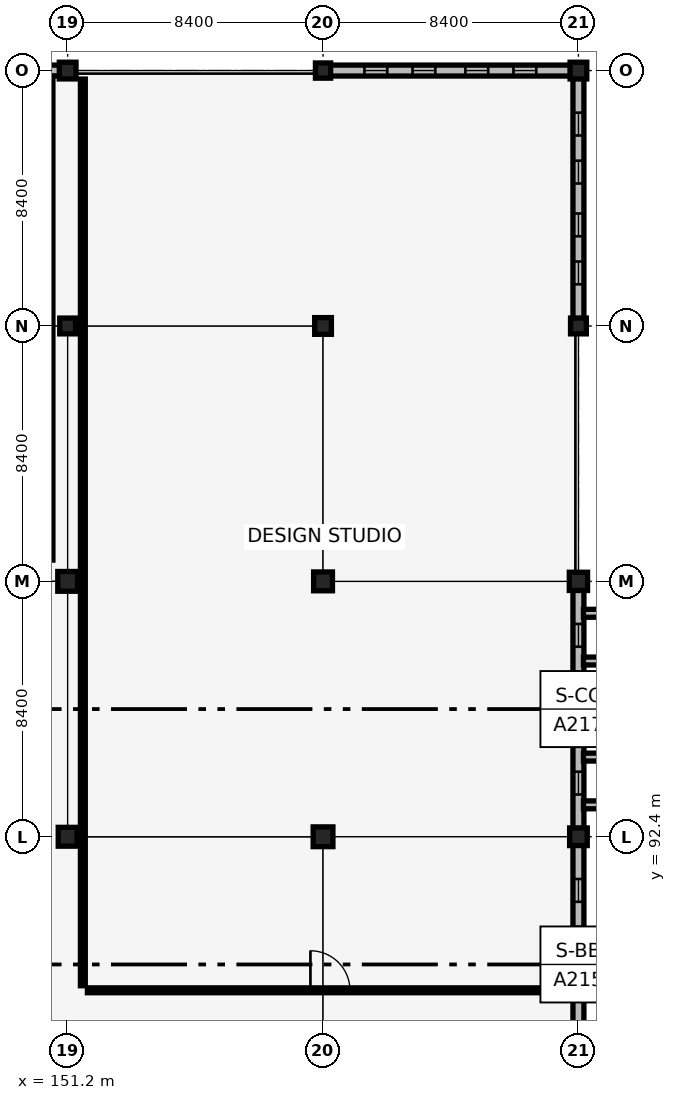
"""IFC4 building model, lengths in metres.
Left out: names, types, materials, properties, quantities, classifications, styles, units other than length and angle.
Written with IfcOpenShell. Run it as: python <this file> out.ifc"""

import sys

from ifc_helpers import new_model, si_unit, direction, frame, frame_2d, origin, origin_2d, place, context, subcontext, project, spatial, rectangle, extrude, element, fill, save


model = new_model("IFC4")
c1 = context("Model", 3, precision=1e-05, world=origin(), true_north=direction((0.0, 1.0)))
c2 = subcontext(c1, "Body", "Model", "MODEL_VIEW")
j1 = project(units=[si_unit("LENGTHUNIT", "METRE"), si_unit("PLANEANGLEUNIT", "RADIAN")], contexts=[c1])
p1 = place(None, origin())
s1 = spatial("IfcSite", under=j1, at=p1, CompositionType="ELEMENT")
p2 = place(p1, origin())
s2 = spatial("IfcBuilding", under=s1, at=p2, CompositionType="ELEMENT")
p3 = place(p2, frame((0.0, 0.0, 13.94)))
s3 = spatial("IfcBuildingStorey", under=s2, at=p3, CompositionType="ELEMENT", Elevation=13.94)
p4 = place(p3, frame((151.2, 92.4, 0.0), z_axis=(0.0, 0.0, 1.0), x_axis=(1.0, 0.0, 0.0)))
e1 = element("IfcColumn", 1, at=p4, inside=s3, PredefinedType="COLUMN", context=c2, shape_type="SweptSolid", body=[
    extrude(rectangle(XDim=0.62, YDim=0.62, at=origin_2d()), origin(), (0.0, 0.0, 1.0), 3.78),
])
p5 = place(p3, frame((151.2, 100.8, 0.0), z_axis=(0.0, 0.0, 1.0), x_axis=(1.0, 0.0, 0.0)))
e2 = element("IfcColumn", 2, at=p5, inside=s3, PredefinedType="COLUMN", context=c2, shape_type="SweptSolid", body=[
    extrude(rectangle(XDim=0.65, YDim=0.65, at=origin_2d()), origin(), (0.0, 0.0, 1.0), 3.78),
])
p6 = place(p3, frame((151.2, 109.2, 0.0), z_axis=(0.0, 0.0, 1.0), x_axis=(1.0, 0.0, 0.0)))
e3 = element("IfcColumn", 3, at=p6, inside=s3, PredefinedType="COLUMN", context=c2, shape_type="SweptSolid", body=[
    extrude(rectangle(XDim=0.52, YDim=0.52, at=origin_2d()), origin(), (0.0, 0.0, 1.0), 3.78),
])
p7 = place(p3, frame((151.2, 117.6, 0.0), z_axis=(0.0, 0.0, 1.0), x_axis=(1.0, 0.0, 0.0)))
e4 = element("IfcColumn", 4, at=p7, inside=s3, PredefinedType="COLUMN", context=c2, shape_type="SweptSolid", body=[
    extrude(rectangle(XDim=0.55, YDim=0.55, at=origin_2d()), origin(), (0.0, 0.0, 1.0), 3.78),
])
p8 = place(p3, frame((159.6, 92.4, 0.0), z_axis=(0.0, 0.0, 1.0), x_axis=(1.0, 0.0, 0.0)))
e5 = element("IfcColumn", 5, at=p8, inside=s3, PredefinedType="COLUMN", context=c2, shape_type="SweptSolid", body=[
    extrude(rectangle(XDim=0.65, YDim=0.65, at=origin_2d()), origin(), (0.0, 0.0, 1.0), 3.78),
])
p9 = place(p3, frame((159.6, 100.8, 0.0), z_axis=(0.0, 0.0, 1.0), x_axis=(1.0, 0.0, 0.0)))
e6 = element("IfcColumn", 6, at=p9, inside=s3, PredefinedType="COLUMN", context=c2, shape_type="SweptSolid", body=[
    extrude(rectangle(XDim=0.62, YDim=0.62, at=origin_2d()), origin(), (0.0, 0.0, 1.0), 3.78),
])
p10 = place(p3, frame((159.6, 109.2, 0.0), z_axis=(0.0, 0.0, 1.0), x_axis=(1.0, 0.0, 0.0)))
e7 = element("IfcColumn", 7, at=p10, inside=s3, PredefinedType="COLUMN", context=c2, shape_type="SweptSolid", body=[
    extrude(rectangle(XDim=0.55, YDim=0.55, at=origin_2d()), origin(), (0.0, 0.0, 1.0), 3.78),
])
p11 = place(p3, frame((159.6, 117.6, 0.0), z_axis=(0.0, 0.0, 1.0), x_axis=(1.0, 0.0, 0.0)))
e8 = element("IfcColumn", 8, at=p11, inside=s3, PredefinedType="COLUMN", context=c2, shape_type="SweptSolid", body=[
    extrude(rectangle(XDim=0.5, YDim=0.5, at=origin_2d()), origin(), (0.0, 0.0, 1.0), 3.78),
])
p12 = place(p3, frame((168.0, 92.4, 0.0), z_axis=(0.0, 0.0, 1.0), x_axis=(1.0, 0.0, 0.0)))
e9 = element("IfcColumn", 9, at=p12, inside=s3, PredefinedType="COLUMN", context=c2, shape_type="SweptSolid", body=[
    extrude(rectangle(XDim=0.58, YDim=0.58, at=origin_2d()), origin(), (0.0, 0.0, 1.0), 3.78),
])
p13 = place(p3, frame((168.0, 100.8, 0.0), z_axis=(0.0, 0.0, 1.0), x_axis=(1.0, 0.0, 0.0)))
e10 = element("IfcColumn", 10, at=p13, inside=s3, PredefinedType="COLUMN", context=c2, shape_type="SweptSolid", body=[
    extrude(rectangle(XDim=0.6, YDim=0.6, at=origin_2d()), origin(), (0.0, 0.0, 1.0), 3.78),
])
p14 = place(p3, frame((168.0, 109.2, 0.0), z_axis=(0.0, 0.0, 1.0), x_axis=(1.0, 0.0, 0.0)))
e11 = element("IfcColumn", 11, at=p14, inside=s3, PredefinedType="COLUMN", context=c2, shape_type="SweptSolid", body=[
    extrude(rectangle(XDim=0.52, YDim=0.52, at=origin_2d()), origin(), (0.0, 0.0, 1.0), 3.78),
])
p15 = place(p3, frame((168.0, 117.6, 0.0), z_axis=(0.0, 0.0, 1.0), x_axis=(1.0, 0.0, 0.0)))
e12 = element("IfcColumn", 12, at=p15, inside=s3, PredefinedType="COLUMN", context=c2, shape_type="SweptSolid", body=[
    extrude(rectangle(XDim=0.55, YDim=0.55, at=origin_2d()), origin(), (0.0, 0.0, 1.0), 3.78),
])
p16 = place(p3, frame((143.035, 117.6, 0.0), z_axis=(0.0, 0.0, 1.0), x_axis=(1.0, 0.0, 0.0)))
e13 = element("IfcWall", 13, at=p16, inside=s3, PredefinedType="SOLIDWALL", context=c2, shape_type="SweptSolid", body=[
    extrude(rectangle(XDim=7.905, YDim=0.36, at=frame_2d((3.953, 0.0))), origin(), (0.0, 0.0, 1.0), 3.15),
])
p17 = place(p16, frame((1.127, 0.0, 0.7)))
e14 = element("IfcOpeningElement", 14, at=p17, cuts=e13, PredefinedType="OPENING", context=c2, shape_type="SweptSolid", body=[
    extrude(rectangle(XDim=0.75, YDim=2.1, at=frame_2d((0.375, 1.05))), frame((0.0, 0.19, 0.0), z_axis=(0.0, -1.0, 0.0), x_axis=(1.0, 0.0, 0.0)), (0.0, 0.0, 1.0), 0.38),
])
p18 = place(p16, frame((2.708, 0.0, 0.7)))
e15 = element("IfcOpeningElement", 15, at=p18, cuts=e13, PredefinedType="OPENING", context=c2, shape_type="SweptSolid", body=[
    extrude(rectangle(XDim=0.75, YDim=2.1, at=frame_2d((0.375, 1.05))), frame((0.0, 0.19, 0.0), z_axis=(0.0, -1.0, 0.0), x_axis=(1.0, 0.0, 0.0)), (0.0, 0.0, 1.0), 0.38),
])
p19 = place(p16, frame((4.447, 0.0, 0.7)))
e16 = element("IfcOpeningElement", 16, at=p19, cuts=e13, PredefinedType="OPENING", context=c2, shape_type="SweptSolid", body=[
    extrude(rectangle(XDim=0.75, YDim=2.1, at=frame_2d((0.375, 1.05))), frame((0.0, 0.19, 0.0), z_axis=(0.0, -1.0, 0.0), x_axis=(1.0, 0.0, 0.0)), (0.0, 0.0, 1.0), 0.38),
])
p20 = place(p16, frame((6.028, 0.0, 0.7)))
e17 = element("IfcOpeningElement", 17, at=p20, cuts=e13, PredefinedType="OPENING", context=c2, shape_type="SweptSolid", body=[
    extrude(rectangle(XDim=0.75, YDim=2.1, at=frame_2d((0.375, 1.05))), frame((0.0, 0.19, 0.0), z_axis=(0.0, -1.0, 0.0), x_axis=(1.0, 0.0, 0.0)), (0.0, 0.0, 1.0), 0.38),
])
p21 = place(p3, frame((168.0, 84.285, 0.0), z_axis=(0.0, 0.0, 1.0), x_axis=(0.0, 1.0, 0.0)))
e18 = element("IfcWall", 18, at=p21, inside=s3, PredefinedType="SOLIDWALL", context=c2, shape_type="SweptSolid", body=[
    extrude(rectangle(XDim=7.84, YDim=0.36, at=frame_2d((3.92, 0.0))), origin(), (0.0, 0.0, 1.0), 3.15),
])
p22 = place(p21, frame((1.115, 0.0, 0.7)))
e19 = element("IfcOpeningElement", 19, at=p22, cuts=e18, PredefinedType="OPENING", context=c2, shape_type="SweptSolid", body=[
    extrude(rectangle(XDim=0.75, YDim=2.1, at=frame_2d((0.375, 1.05))), frame((0.0, 0.19, 0.0), z_axis=(0.0, -1.0, 0.0), x_axis=(1.0, 0.0, 0.0)), (0.0, 0.0, 1.0), 0.38),
])
p23 = place(p21, frame((4.407, 0.0, 0.7)))
e20 = element("IfcOpeningElement", 20, at=p23, cuts=e18, PredefinedType="OPENING", context=c2, shape_type="SweptSolid", body=[
    extrude(rectangle(XDim=0.75, YDim=2.1, at=frame_2d((0.375, 1.05))), frame((0.0, 0.19, 0.0), z_axis=(0.0, -1.0, 0.0), x_axis=(1.0, 0.0, 0.0)), (0.0, 0.0, 1.0), 0.38),
])
p24 = place(p21, frame((5.975, 0.0, 0.7)))
e21 = element("IfcOpeningElement", 21, at=p24, cuts=e18, PredefinedType="OPENING", context=c2, shape_type="SweptSolid", body=[
    extrude(rectangle(XDim=0.75, YDim=2.1, at=frame_2d((0.375, 1.05))), frame((0.0, 0.19, 0.0), z_axis=(0.0, -1.0, 0.0), x_axis=(1.0, 0.0, 0.0)), (0.0, 0.0, 1.0), 0.38),
])
p25 = place(p3, frame((168.0, 92.675, 0.0), z_axis=(0.0, 0.0, 1.0), x_axis=(0.0, 1.0, 0.0)))
e22 = element("IfcWall", 22, at=p25, inside=s3, PredefinedType="SOLIDWALL", context=c2, shape_type="SweptSolid", body=[
    extrude(rectangle(XDim=7.84, YDim=0.36, at=frame_2d((3.92, 0.0))), origin(), (0.0, 0.0, 1.0), 3.15),
])
p26 = place(p25, frame((1.115, 0.0, 0.7)))
e23 = element("IfcOpeningElement", 23, at=p26, cuts=e22, PredefinedType="OPENING", context=c2, shape_type="SweptSolid", body=[
    extrude(rectangle(XDim=0.75, YDim=2.1, at=frame_2d((0.375, 1.05))), frame((0.0, 0.19, 0.0), z_axis=(0.0, -1.0, 0.0), x_axis=(1.0, 0.0, 0.0)), (0.0, 0.0, 1.0), 0.38),
])
p27 = place(p25, frame((2.683, 0.0, 0.7)))
e24 = element("IfcOpeningElement", 24, at=p27, cuts=e22, PredefinedType="OPENING", context=c2, shape_type="SweptSolid", body=[
    extrude(rectangle(XDim=0.75, YDim=2.1, at=frame_2d((0.375, 1.05))), frame((0.0, 0.19, 0.0), z_axis=(0.0, -1.0, 0.0), x_axis=(1.0, 0.0, 0.0)), (0.0, 0.0, 1.0), 0.38),
])
p28 = place(p25, frame((4.407, 0.0, 0.7)))
e25 = element("IfcOpeningElement", 25, at=p28, cuts=e22, PredefinedType="OPENING", context=c2, shape_type="SweptSolid", body=[
    extrude(rectangle(XDim=0.75, YDim=2.1, at=frame_2d((0.375, 1.05))), frame((0.0, 0.19, 0.0), z_axis=(0.0, -1.0, 0.0), x_axis=(1.0, 0.0, 0.0)), (0.0, 0.0, 1.0), 0.38),
])
p29 = place(p25, frame((5.975, 0.0, 0.7)))
e26 = element("IfcOpeningElement", 26, at=p29, cuts=e22, PredefinedType="OPENING", context=c2, shape_type="SweptSolid", body=[
    extrude(rectangle(XDim=0.75, YDim=2.1, at=frame_2d((0.375, 1.05))), frame((0.0, 0.19, 0.0), z_axis=(0.0, -1.0, 0.0), x_axis=(1.0, 0.0, 0.0)), (0.0, 0.0, 1.0), 0.38),
])
for number, where, z_axis, x_axis in (
    (27, (168.165, 93.45, 0.0), (0.0, 0.0, 1.0), (1.0, 0.0, 0.0)),
    (28, (168.165, 95.02, 0.0), (0.0, 0.0, 1.0), (1.0, 0.0, 0.0)),
    (29, (168.165, 96.6, 0.0), (0.0, 0.0, 1.0), (1.0, 0.0, 0.0)),
    (30, (168.165, 98.18, 0.0), (0.0, 0.0, 1.0), (1.0, 0.0, 0.0)),
    (31, (168.165, 99.75, 0.0), (0.0, 0.0, 1.0), (1.0, 0.0, 0.0)),
):
    element("IfcWall", number, at=place(p3, frame(where, z_axis=z_axis, x_axis=x_axis)), inside=s3, PredefinedType="SOLIDWALL", context=c2, shape_type="SweptSolid", body=[
        extrude(rectangle(XDim=0.7, YDim=0.26, at=frame_2d((0.35, 0.0))), origin(), (0.0, 0.0, 1.0), 4.08),
    ])
p30 = place(p3, frame((159.835, 117.6, 0.0), z_axis=(0.0, 0.0, 1.0), x_axis=(1.0, 0.0, 0.0)))
e32 = element("IfcWall", 32, at=p30, inside=s3, PredefinedType="SOLIDWALL", context=c2, shape_type="SweptSolid", body=[
    extrude(rectangle(XDim=7.905, YDim=0.36, at=frame_2d((3.953, 0.0))), origin(), (0.0, 0.0, 1.0), 3.15),
])
p31 = place(p30, frame((1.127, 0.0, 0.7)))
e33 = element("IfcOpeningElement", 33, at=p31, cuts=e32, PredefinedType="OPENING", context=c2, shape_type="SweptSolid", body=[
    extrude(rectangle(XDim=0.75, YDim=2.1, at=frame_2d((0.375, 1.05))), frame((0.0, 0.19, 0.0), z_axis=(0.0, -1.0, 0.0), x_axis=(1.0, 0.0, 0.0)), (0.0, 0.0, 1.0), 0.38),
])
p32 = place(p30, frame((2.708, 0.0, 0.7)))
e34 = element("IfcOpeningElement", 34, at=p32, cuts=e32, PredefinedType="OPENING", context=c2, shape_type="SweptSolid", body=[
    extrude(rectangle(XDim=0.75, YDim=2.1, at=frame_2d((0.375, 1.05))), frame((0.0, 0.19, 0.0), z_axis=(0.0, -1.0, 0.0), x_axis=(1.0, 0.0, 0.0)), (0.0, 0.0, 1.0), 0.38),
])
p33 = place(p30, frame((4.447, 0.0, 0.7)))
e35 = element("IfcOpeningElement", 35, at=p33, cuts=e32, PredefinedType="OPENING", context=c2, shape_type="SweptSolid", body=[
    extrude(rectangle(XDim=0.75, YDim=2.1, at=frame_2d((0.375, 1.05))), frame((0.0, 0.19, 0.0), z_axis=(0.0, -1.0, 0.0), x_axis=(1.0, 0.0, 0.0)), (0.0, 0.0, 1.0), 0.38),
])
p34 = place(p30, frame((6.028, 0.0, 0.7)))
e36 = element("IfcOpeningElement", 36, at=p34, cuts=e32, PredefinedType="OPENING", context=c2, shape_type="SweptSolid", body=[
    extrude(rectangle(XDim=0.75, YDim=2.1, at=frame_2d((0.375, 1.05))), frame((0.0, 0.19, 0.0), z_axis=(0.0, -1.0, 0.0), x_axis=(1.0, 0.0, 0.0)), (0.0, 0.0, 1.0), 0.38),
])
p35 = place(p3, frame((168.0, 109.445, 0.0), z_axis=(0.0, 0.0, 1.0), x_axis=(0.0, 1.0, 0.0)))
e37 = element("IfcWall", 37, at=p35, inside=s3, PredefinedType="SOLIDWALL", context=c2, shape_type="SweptSolid", body=[
    extrude(rectangle(XDim=7.895, YDim=0.36, at=frame_2d((3.948, 0.0))), origin(), (0.0, 0.0, 1.0), 3.15),
])
p36 = place(p35, frame((1.125, 0.0, 0.7)))
e38 = element("IfcOpeningElement", 38, at=p36, cuts=e37, PredefinedType="OPENING", context=c2, shape_type="SweptSolid", body=[
    extrude(rectangle(XDim=0.75, YDim=2.1, at=frame_2d((0.375, 1.05))), frame((0.0, 0.19, 0.0), z_axis=(0.0, -1.0, 0.0), x_axis=(1.0, 0.0, 0.0)), (0.0, 0.0, 1.0), 0.38),
])
p37 = place(p35, frame((2.704, 0.0, 0.7)))
e39 = element("IfcOpeningElement", 39, at=p37, cuts=e37, PredefinedType="OPENING", context=c2, shape_type="SweptSolid", body=[
    extrude(rectangle(XDim=0.75, YDim=2.1, at=frame_2d((0.375, 1.05))), frame((0.0, 0.19, 0.0), z_axis=(0.0, -1.0, 0.0), x_axis=(1.0, 0.0, 0.0)), (0.0, 0.0, 1.0), 0.38),
])
p38 = place(p35, frame((4.441, 0.0, 0.7)))
e40 = element("IfcOpeningElement", 40, at=p38, cuts=e37, PredefinedType="OPENING", context=c2, shape_type="SweptSolid", body=[
    extrude(rectangle(XDim=0.75, YDim=2.1, at=frame_2d((0.375, 1.05))), frame((0.0, 0.19, 0.0), z_axis=(0.0, -1.0, 0.0), x_axis=(1.0, 0.0, 0.0)), (0.0, 0.0, 1.0), 0.38),
])
p39 = place(p35, frame((6.02, 0.0, 0.7)))
e41 = element("IfcOpeningElement", 41, at=p39, cuts=e37, PredefinedType="OPENING", context=c2, shape_type="SweptSolid", body=[
    extrude(rectangle(XDim=0.75, YDim=2.1, at=frame_2d((0.375, 1.05))), frame((0.0, 0.19, 0.0), z_axis=(0.0, -1.0, 0.0), x_axis=(1.0, 0.0, 0.0)), (0.0, 0.0, 1.0), 0.38),
])
p40 = place(p3, frame((151.85, 87.35, 0.0), z_axis=(0.0, 0.0, 1.0), x_axis=(1.0, 0.0, 0.0)))
e42 = element("IfcWall", 42, at=p40, inside=s3, PredefinedType="PARTITIONING", context=c2, shape_type="SweptSolid", body=[
    extrude(rectangle(XDim=15.97, YDim=0.16, at=frame_2d((7.985, 0.0))), origin(), (0.0, 0.0, 1.0), 3.15),
])
p41 = place(p40, frame((7.335, 0.0, 0.0)))
e43 = element("IfcOpeningElement", 43, at=p41, cuts=e42, PredefinedType="OPENING", context=c2, shape_type="SweptSolid", body=[
    extrude(rectangle(XDim=1.3, YDim=2.2, at=frame_2d((0.65, 1.1))), frame((0.0, 0.09, 0.0), z_axis=(0.0, -1.0, 0.0), x_axis=(1.0, 0.0, 0.0)), (0.0, 0.0, 1.0), 0.18),
])
p42 = place(p3, frame((151.7, 87.5, 0.0), z_axis=(0.0, 0.0, 1.0), x_axis=(0.0, 1.0, 0.0)))
e44 = element("IfcWall", 44, at=p42, inside=s3, PredefinedType="PARTITIONING", context=c2, shape_type="SweptSolid", body=[
    extrude(rectangle(XDim=29.82, YDim=0.16, at=frame_2d((14.91, 0.0))), origin(), (0.0, 0.0, 1.0), 3.05),
])
p43 = place(p3, frame((150.65, 101.5, 0.0), z_axis=(0.0, 0.0, 1.0), x_axis=(0.0, 1.0, 0.0)))
e45 = element("IfcWall", 45, at=p43, inside=s3, PredefinedType="PARTITIONING", context=c2, shape_type="SweptSolid", body=[
    extrude(rectangle(XDim=15.92, YDim=0.13, at=frame_2d((7.96, 0.0))), origin(), (0.0, 0.0, 1.0), 3.13),
])
p44 = place(p23, origin())
e46 = element("IfcWindow", 46, at=p44, inside=s3, PartitioningType="DOUBLE_PANEL_VERTICAL", PredefinedType="WINDOW", context=c2, shape_type="SweptSolid", body=[
    extrude(rectangle(XDim=0.75, YDim=2.1, at=frame_2d((0.375, 1.05))), frame((0.0, 0.03, 0.0), z_axis=(0.0, -1.0, 0.0), x_axis=(1.0, 0.0, 0.0)), (0.0, 0.0, 1.0), 0.06),
])
fill(e20, e46)
p45 = place(p24, origin())
e47 = element("IfcWindow", 47, at=p45, inside=s3, PartitioningType="DOUBLE_PANEL_VERTICAL", PredefinedType="WINDOW", context=c2, shape_type="SweptSolid", body=[
    extrude(rectangle(XDim=0.75, YDim=2.1, at=frame_2d((0.375, 1.05))), frame((0.0, 0.03, 0.0), z_axis=(0.0, -1.0, 0.0), x_axis=(1.0, 0.0, 0.0)), (0.0, 0.0, 1.0), 0.06),
])
fill(e21, e47)
p46 = place(p26, origin())
e48 = element("IfcWindow", 48, at=p46, inside=s3, PartitioningType="DOUBLE_PANEL_VERTICAL", PredefinedType="WINDOW", context=c2, shape_type="SweptSolid", body=[
    extrude(rectangle(XDim=0.75, YDim=2.1, at=frame_2d((0.375, 1.05))), frame((0.0, 0.03, 0.0), z_axis=(0.0, -1.0, 0.0), x_axis=(1.0, 0.0, 0.0)), (0.0, 0.0, 1.0), 0.06),
])
fill(e23, e48)
p47 = place(p27, origin())
e49 = element("IfcWindow", 49, at=p47, inside=s3, PartitioningType="DOUBLE_PANEL_VERTICAL", PredefinedType="WINDOW", context=c2, shape_type="SweptSolid", body=[
    extrude(rectangle(XDim=0.75, YDim=2.1, at=frame_2d((0.375, 1.05))), frame((0.0, 0.03, 0.0), z_axis=(0.0, -1.0, 0.0), x_axis=(1.0, 0.0, 0.0)), (0.0, 0.0, 1.0), 0.06),
])
fill(e24, e49)
p48 = place(p28, origin())
e50 = element("IfcWindow", 50, at=p48, inside=s3, PartitioningType="DOUBLE_PANEL_VERTICAL", PredefinedType="WINDOW", context=c2, shape_type="SweptSolid", body=[
    extrude(rectangle(XDim=0.75, YDim=2.1, at=frame_2d((0.375, 1.05))), frame((0.0, 0.03, 0.0), z_axis=(0.0, -1.0, 0.0), x_axis=(1.0, 0.0, 0.0)), (0.0, 0.0, 1.0), 0.06),
])
fill(e25, e50)
p49 = place(p29, origin())
e51 = element("IfcWindow", 51, at=p49, inside=s3, PartitioningType="DOUBLE_PANEL_VERTICAL", PredefinedType="WINDOW", context=c2, shape_type="SweptSolid", body=[
    extrude(rectangle(XDim=0.75, YDim=2.1, at=frame_2d((0.375, 1.05))), frame((0.0, 0.03, 0.0), z_axis=(0.0, -1.0, 0.0), x_axis=(1.0, 0.0, 0.0)), (0.0, 0.0, 1.0), 0.06),
])
fill(e26, e51)
p50 = place(p31, origin())
e52 = element("IfcWindow", 52, at=p50, inside=s3, PartitioningType="DOUBLE_PANEL_VERTICAL", PredefinedType="WINDOW", context=c2, shape_type="SweptSolid", body=[
    extrude(rectangle(XDim=0.75, YDim=2.1, at=frame_2d((0.375, 1.05))), frame((0.0, 0.03, 0.0), z_axis=(0.0, -1.0, 0.0), x_axis=(1.0, 0.0, 0.0)), (0.0, 0.0, 1.0), 0.06),
])
fill(e33, e52)
p51 = place(p32, origin())
e53 = element("IfcWindow", 53, at=p51, inside=s3, PartitioningType="DOUBLE_PANEL_VERTICAL", PredefinedType="WINDOW", context=c2, shape_type="SweptSolid", body=[
    extrude(rectangle(XDim=0.75, YDim=2.1, at=frame_2d((0.375, 1.05))), frame((0.0, 0.03, 0.0), z_axis=(0.0, -1.0, 0.0), x_axis=(1.0, 0.0, 0.0)), (0.0, 0.0, 1.0), 0.06),
])
fill(e34, e53)
p52 = place(p33, origin())
e54 = element("IfcWindow", 54, at=p52, inside=s3, PartitioningType="DOUBLE_PANEL_VERTICAL", PredefinedType="WINDOW", context=c2, shape_type="SweptSolid", body=[
    extrude(rectangle(XDim=0.75, YDim=2.1, at=frame_2d((0.375, 1.05))), frame((0.0, 0.03, 0.0), z_axis=(0.0, -1.0, 0.0), x_axis=(1.0, 0.0, 0.0)), (0.0, 0.0, 1.0), 0.06),
])
fill(e35, e54)
p53 = place(p34, origin())
e55 = element("IfcWindow", 55, at=p53, inside=s3, PartitioningType="DOUBLE_PANEL_VERTICAL", PredefinedType="WINDOW", context=c2, shape_type="SweptSolid", body=[
    extrude(rectangle(XDim=0.75, YDim=2.1, at=frame_2d((0.375, 1.05))), frame((0.0, 0.03, 0.0), z_axis=(0.0, -1.0, 0.0), x_axis=(1.0, 0.0, 0.0)), (0.0, 0.0, 1.0), 0.06),
])
fill(e36, e55)
p54 = place(p36, origin())
e56 = element("IfcWindow", 56, at=p54, inside=s3, PartitioningType="DOUBLE_PANEL_VERTICAL", PredefinedType="WINDOW", context=c2, shape_type="SweptSolid", body=[
    extrude(rectangle(XDim=0.75, YDim=2.1, at=frame_2d((0.375, 1.05))), frame((0.0, 0.03, 0.0), z_axis=(0.0, -1.0, 0.0), x_axis=(1.0, 0.0, 0.0)), (0.0, 0.0, 1.0), 0.06),
])
fill(e38, e56)
p55 = place(p37, origin())
e57 = element("IfcWindow", 57, at=p55, inside=s3, PartitioningType="DOUBLE_PANEL_VERTICAL", PredefinedType="WINDOW", context=c2, shape_type="SweptSolid", body=[
    extrude(rectangle(XDim=0.75, YDim=2.1, at=frame_2d((0.375, 1.05))), frame((0.0, 0.03, 0.0), z_axis=(0.0, -1.0, 0.0), x_axis=(1.0, 0.0, 0.0)), (0.0, 0.0, 1.0), 0.06),
])
fill(e39, e57)
p56 = place(p38, origin())
e58 = element("IfcWindow", 58, at=p56, inside=s3, PartitioningType="DOUBLE_PANEL_VERTICAL", PredefinedType="WINDOW", context=c2, shape_type="SweptSolid", body=[
    extrude(rectangle(XDim=0.75, YDim=2.1, at=frame_2d((0.375, 1.05))), frame((0.0, 0.03, 0.0), z_axis=(0.0, -1.0, 0.0), x_axis=(1.0, 0.0, 0.0)), (0.0, 0.0, 1.0), 0.06),
])
fill(e40, e58)
p57 = place(p39, origin())
e59 = element("IfcWindow", 59, at=p57, inside=s3, PartitioningType="DOUBLE_PANEL_VERTICAL", PredefinedType="WINDOW", context=c2, shape_type="SweptSolid", body=[
    extrude(rectangle(XDim=0.75, YDim=2.1, at=frame_2d((0.375, 1.05))), frame((0.0, 0.03, 0.0), z_axis=(0.0, -1.0, 0.0), x_axis=(1.0, 0.0, 0.0)), (0.0, 0.0, 1.0), 0.06),
])
fill(e41, e59)
p58 = place(p41, origin())
e60 = element("IfcDoor", 60, at=p58, inside=s3, OperationType="SINGLE_SWING_LEFT", PredefinedType="DOOR", context=c2, shape_type="SweptSolid", body=[
    extrude(rectangle(XDim=1.3, YDim=2.2, at=frame_2d((0.65, 1.1))), frame((0.0, 0.025, 0.0), z_axis=(0.0, -1.0, 0.0), x_axis=(1.0, 0.0, 0.0)), (0.0, 0.0, 1.0), 0.05),
])
fill(e43, e60)
save(model, sys.argv[1])
